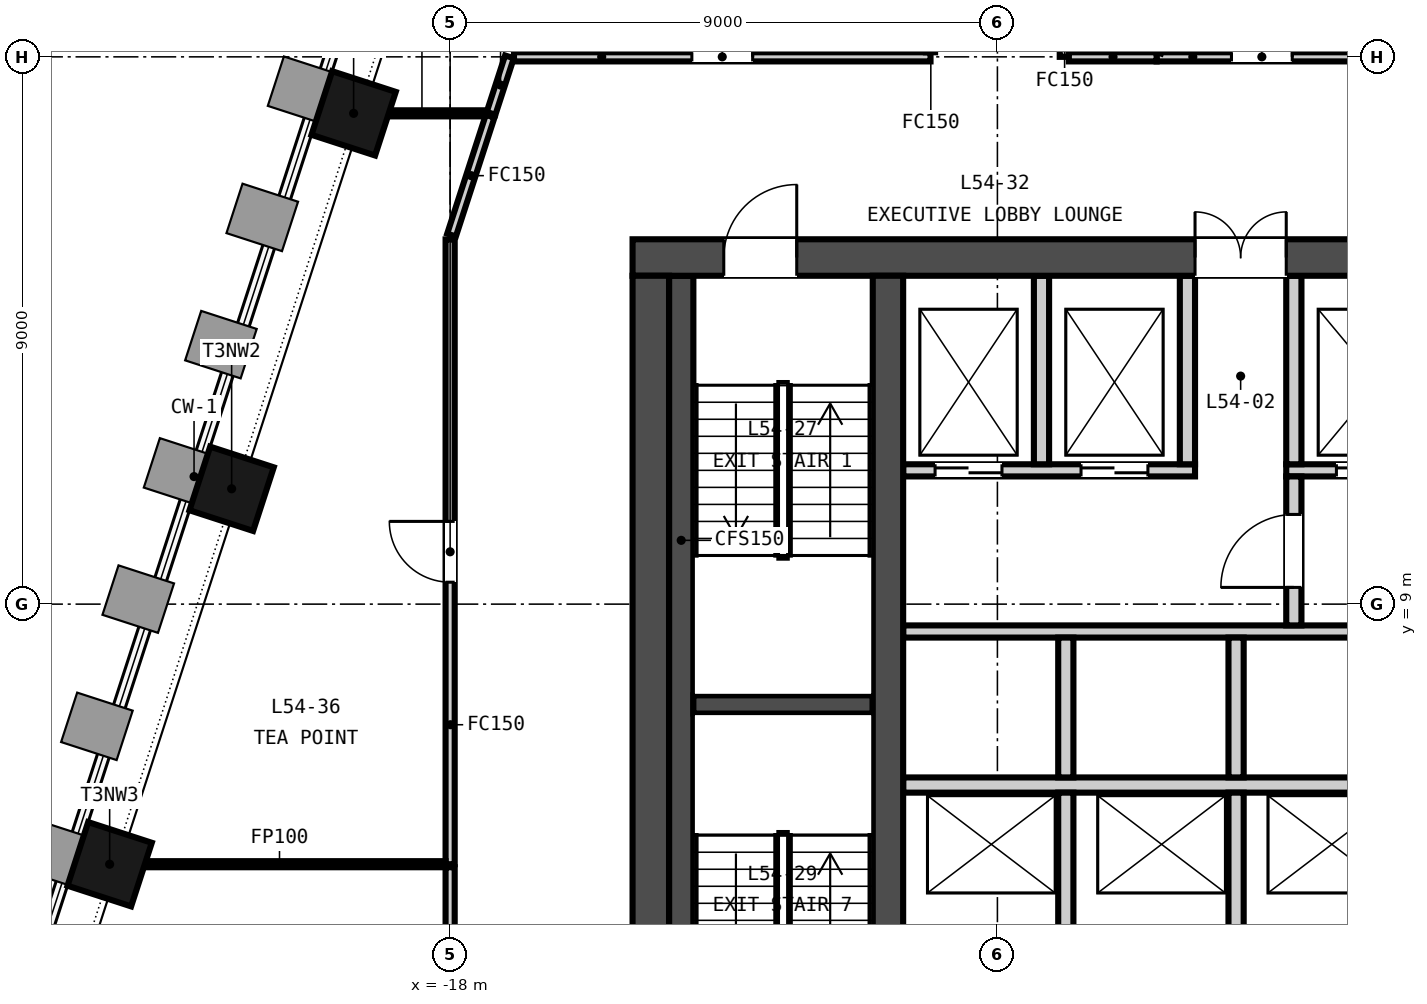
"""IFC4 building model, lengths in metres.
Left out: names, types, materials, properties, quantities, classifications, styles, units other than length and angle.
Written with IfcOpenShell. Run it as: python <this file> out.ifc"""

import sys

from ifc_helpers import new_model, si_unit, direction, frame, frame_2d, origin, origin_2d, place, context, subcontext, project, spatial, rectangle, extrude, element, fill, save


model = new_model("IFC4")
c1 = context("Model", 3, precision=1e-05, world=origin(), true_north=direction((0.0, 1.0)))
c2 = subcontext(c1, "Body", "Model", "MODEL_VIEW")
j1 = project(units=[si_unit("LENGTHUNIT", "METRE"), si_unit("PLANEANGLEUNIT", "RADIAN")], contexts=[c1])
p1 = place(None, origin())
s1 = spatial("IfcSite", under=j1, at=p1, CompositionType="ELEMENT")
p2 = place(p1, origin())
s2 = spatial("IfcBuilding", under=s1, at=p2, CompositionType="ELEMENT")
p3 = place(p2, frame((0.0, 0.0, 216.3)))
s3 = spatial("IfcBuildingStorey", under=s2, at=p3, CompositionType="ELEMENT", Elevation=216.3)
p4 = place(p3, frame((-15.0, 14.7, -0.15), z_axis=(0.0, 0.0, 1.0), x_axis=(1.0, 0.0, 0.0)))
e1 = element("IfcWall", 1, at=p4, inside=s3, PredefinedType="SOLIDWALL", context=c2, shape_type="SweptSolid", body=[
    extrude(rectangle(XDim=30.0, YDim=0.6, at=frame_2d((15.0, 0.0))), origin(), (0.0, 0.0, 1.0), 3.65),
])
p5 = place(p4, frame((9.25, 0.0, 0.15)))
e2 = element("IfcOpeningElement", 2, at=p5, cuts=e1, PredefinedType="OPENING", context=c2, shape_type="SweptSolid", body=[
    extrude(rectangle(XDim=1.5, YDim=2.1, at=frame_2d((0.75, 1.05))), frame((0.0, 0.31, 0.0), z_axis=(0.0, -1.0, 0.0), x_axis=(1.0, 0.0, 0.0)), (0.0, 0.0, 1.0), 0.62),
])
p6 = place(p4, frame((19.4, 0.0, 0.15)))
e3 = element("IfcOpeningElement", 3, at=p6, cuts=e1, PredefinedType="OPENING", context=c2, shape_type="SweptSolid", body=[
    extrude(rectangle(XDim=1.5, YDim=2.1, at=frame_2d((0.75, 1.05))), frame((0.0, 0.31, 0.0), z_axis=(0.0, -1.0, 0.0), x_axis=(1.0, 0.0, 0.0)), (0.0, 0.0, 1.0), 0.62),
])
p7 = place(p4, frame((1.5, 0.0, 0.15)))
e4 = element("IfcOpeningElement", 4, at=p7, cuts=e1, PredefinedType="OPENING", context=c2, shape_type="SweptSolid", body=[
    extrude(rectangle(XDim=1.2, YDim=2.1, at=frame_2d((0.6, 1.05))), frame((0.0, 0.31, 0.0), z_axis=(0.0, -1.0, 0.0), x_axis=(1.0, 0.0, 0.0)), (0.0, 0.0, 1.0), 0.62),
])
p8 = place(p4, frame((27.3, 0.0, 0.15)))
e5 = element("IfcOpeningElement", 5, at=p8, cuts=e1, PredefinedType="OPENING", context=c2, shape_type="SweptSolid", body=[
    extrude(rectangle(XDim=1.2, YDim=2.1, at=frame_2d((0.6, 1.05))), frame((0.0, 0.31, 0.0), z_axis=(0.0, -1.0, 0.0), x_axis=(1.0, 0.0, 0.0)), (0.0, 0.0, 1.0), 0.62),
])
p9 = place(p3, frame((-14.7, 0.6, -0.15), z_axis=(0.0, 0.0, 1.0), x_axis=(0.0, 1.0, 0.0)))
e6 = element("IfcWall", 6, at=p9, inside=s3, PredefinedType="SOLIDWALL", context=c2, shape_type="SweptSolid", body=[
    extrude(rectangle(XDim=13.8, YDim=0.6, at=frame_2d((6.9, 0.0))), origin(), (0.0, 0.0, 1.0), 3.65),
])
p10 = place(p3, frame((-10.8, 0.6, -0.15), z_axis=(0.0, 0.0, 1.0), x_axis=(0.0, 1.0, 0.0)))
e7 = element("IfcWall", 7, at=p10, inside=s3, PredefinedType="SOLIDWALL", context=c2, shape_type="SweptSolid", body=[
    extrude(rectangle(XDim=13.8, YDim=0.5, at=frame_2d((6.9, 0.0))), origin(), (0.0, 0.0, 1.0), 3.65),
])
for number, where, z_axis, x_axis in (
    (8, (-19.587, 17.071, -0.15), (0.0, 0.0, 1.0), (-0.309, -0.951, 0.0)),
    (9, (-21.593, 10.897, -0.15), (0.0, 0.0, 1.0), (-0.309, -0.951, 0.0)),
    (10, (-23.599, 4.723, -0.15), (0.0, 0.0, 1.0), (-0.309, -0.951, 0.0)),
):
    element("IfcColumn", number, at=place(p3, frame(where, z_axis=z_axis, x_axis=x_axis)), inside=s3, PredefinedType="COLUMN", context=c2, shape_type="SweptSolid", body=[
        extrude(rectangle(XDim=1.1, YDim=1.1, at=origin_2d()), origin(), (0.0, 0.0, 1.0), 3.65),
    ])
p11 = place(p3, frame((-10.55, 6.025, 0.0), z_axis=(0.0, 0.0, 1.0), x_axis=(1.0, 0.0, 0.0)))
e11 = element("IfcWall", 11, at=p11, inside=s3, PredefinedType="PARTITIONING", context=c2, shape_type="SweptSolid", body=[
    extrude(rectangle(XDim=21.1, YDim=0.25, at=frame_2d((10.55, 0.0))), origin(), (0.0, 0.0, 1.0), 3.5),
])
p12 = place(p3, frame((-10.55, 8.55, 0.0), z_axis=(0.0, 0.0, 1.0), x_axis=(1.0, 0.0, 0.0)))
e12 = element("IfcWall", 12, at=p12, inside=s3, PredefinedType="PARTITIONING", context=c2, shape_type="SweptSolid", body=[
    extrude(rectangle(XDim=21.1, YDim=0.2, at=frame_2d((10.55, 0.0))), origin(), (0.0, 0.0, 1.0), 3.5),
])
p13 = place(p12, frame((19.9, 0.0, 0.0)))
e13 = element("IfcOpeningElement", 13, at=p13, cuts=e12, PredefinedType="OPENING", context=c2, shape_type="SweptSolid", body=[
    extrude(rectangle(XDim=0.9, YDim=2.1, at=frame_2d((0.45, 1.05))), frame((0.0, 0.11, 0.0), z_axis=(0.0, -1.0, 0.0), x_axis=(1.0, 0.0, 0.0)), (0.0, 0.0, 1.0), 0.22),
])
p14 = place(p3, frame((-10.55, 11.2, 0.0), z_axis=(0.0, 0.0, 1.0), x_axis=(1.0, 0.0, 0.0)))
e14 = element("IfcWall", 14, at=p14, inside=s3, PredefinedType="PARTITIONING", context=c2, shape_type="SweptSolid", body=[
    extrude(rectangle(XDim=4.8, YDim=0.2, at=frame_2d((2.4, 0.0))), origin(), (0.0, 0.0, 1.0), 3.5),
])
p15 = place(p14, frame((0.525, 0.0, 0.0)))
e15 = element("IfcOpeningElement", 15, at=p15, cuts=e14, PredefinedType="OPENING", context=c2, shape_type="SweptSolid", body=[
    extrude(rectangle(XDim=1.1, YDim=2.1, at=frame_2d((0.55, 1.05))), frame((0.0, 0.11, 0.0), z_axis=(0.0, -1.0, 0.0), x_axis=(1.0, 0.0, 0.0)), (0.0, 0.0, 1.0), 0.22),
])
p16 = place(p14, frame((2.925, 0.0, 0.0)))
e16 = element("IfcOpeningElement", 16, at=p16, cuts=e14, PredefinedType="OPENING", context=c2, shape_type="SweptSolid", body=[
    extrude(rectangle(XDim=1.1, YDim=2.1, at=frame_2d((0.55, 1.05))), frame((0.0, 0.11, 0.0), z_axis=(0.0, -1.0, 0.0), x_axis=(1.0, 0.0, 0.0)), (0.0, 0.0, 1.0), 0.22),
])
p17 = place(p3, frame((-4.25, 11.2, 0.0), z_axis=(0.0, 0.0, 1.0), x_axis=(1.0, 0.0, 0.0)))
e17 = element("IfcWall", 17, at=p17, inside=s3, PredefinedType="PARTITIONING", context=c2, shape_type="SweptSolid", body=[
    extrude(rectangle(XDim=8.65, YDim=0.2, at=frame_2d((4.325, 0.0))), origin(), (0.0, 0.0, 1.0), 3.5),
])
p18 = place(p17, frame((0.825, 0.0, 0.0)))
e18 = element("IfcOpeningElement", 18, at=p18, cuts=e17, PredefinedType="OPENING", context=c2, shape_type="SweptSolid", body=[
    extrude(rectangle(XDim=1.4, YDim=2.1, at=frame_2d((0.7, 1.05))), frame((0.0, 0.11, 0.0), z_axis=(0.0, -1.0, 0.0), x_axis=(1.0, 0.0, 0.0)), (0.0, 0.0, 1.0), 0.22),
])
p19 = place(p17, frame((3.625, 0.0, 0.0)))
e19 = element("IfcOpeningElement", 19, at=p19, cuts=e17, PredefinedType="OPENING", context=c2, shape_type="SweptSolid", body=[
    extrude(rectangle(XDim=1.4, YDim=2.1, at=frame_2d((0.7, 1.05))), frame((0.0, 0.11, 0.0), z_axis=(0.0, -1.0, 0.0), x_axis=(1.0, 0.0, 0.0)), (0.0, 0.0, 1.0), 0.22),
])
p20 = place(p3, frame((-4.125, 8.65, 0.0), z_axis=(0.0, 0.0, 1.0), x_axis=(0.0, 1.0, 0.0)))
e20 = element("IfcWall", 20, at=p20, inside=s3, PredefinedType="PARTITIONING", context=c2, shape_type="SweptSolid", body=[
    extrude(rectangle(XDim=2.45, YDim=0.25, at=frame_2d((1.225, 0.0))), origin(), (0.0, 0.0, 1.0), 3.5),
])
p21 = place(p20, frame((0.625, 0.0, 0.0)))
e21 = element("IfcOpeningElement", 21, at=p21, cuts=e20, PredefinedType="OPENING", context=c2, shape_type="SweptSolid", body=[
    extrude(rectangle(XDim=1.2, YDim=2.1, at=frame_2d((0.6, 1.05))), frame((0.0, 0.135, 0.0), z_axis=(0.0, -1.0, 0.0), x_axis=(1.0, 0.0, 0.0)), (0.0, 0.0, 1.0), 0.27),
])
for number, where, z_axis, x_axis in (
    (22, (-7.875, 3.6, 0.0), (0.0, 0.0, 1.0), (0.0, 1.0, 0.0)),
    (23, (-5.075, 3.6, 0.0), (0.0, 0.0, 1.0), (0.0, 1.0, 0.0)),
):
    element("IfcWall", number, at=place(p3, frame(where, z_axis=z_axis, x_axis=x_axis)), inside=s3, PredefinedType="PARTITIONING", context=c2, shape_type="SweptSolid", body=[
        extrude(rectangle(XDim=2.3, YDim=0.25, at=frame_2d((1.15, 0.0))), origin(), (0.0, 0.0, 1.0), 3.5),
    ])
for number, where, z_axis, x_axis in (
    (24, (-7.875, 6.15, 0.0), (0.0, 0.0, 1.0), (0.0, 1.0, 0.0)),
    (25, (-5.075, 6.15, 0.0), (0.0, 0.0, 1.0), (0.0, 1.0, 0.0)),
):
    element("IfcWall", number, at=place(p3, frame(where, z_axis=z_axis, x_axis=x_axis)), inside=s3, PredefinedType="PARTITIONING", context=c2, shape_type="SweptSolid", body=[
        extrude(rectangle(XDim=2.3, YDim=0.25, at=frame_2d((1.15, 0.0))), origin(), (0.0, 0.0, 1.0), 3.5),
    ])
for number, where, z_axis, x_axis in (
    (26, (-8.275, 11.3, 0.0), (0.0, 0.0, 1.0), (0.0, 1.0, 0.0)),
    (27, (-5.875, 11.3, 0.0), (0.0, 0.0, 1.0), (0.0, 1.0, 0.0)),
    (28, (-4.125, 11.3, 0.0), (0.0, 0.0, 1.0), (0.0, 1.0, 0.0)),
):
    element("IfcWall", number, at=place(p3, frame(where, z_axis=z_axis, x_axis=x_axis)), inside=s3, PredefinedType="PARTITIONING", context=c2, shape_type="SweptSolid", body=[
        extrude(rectangle(XDim=3.1, YDim=0.25, at=frame_2d((1.55, 0.0))), origin(), (0.0, 0.0, 1.0), 3.5),
    ])
p22 = place(p3, frame((-14.0, 7.35, 0.0), z_axis=(0.0, 0.0, 1.0), x_axis=(1.0, 0.0, 0.0)))
e29 = element("IfcWall", 29, at=p22, inside=s3, PredefinedType="SOLIDWALL", context=c2, shape_type="SweptSolid", body=[
    extrude(rectangle(XDim=2.95, YDim=0.3, at=frame_2d((1.475, 0.0))), origin(), (0.0, 0.0, 1.0), 3.5),
])
p23 = place(p3, frame((-14.2, 0.6, 0.0), z_axis=(0.0, 0.0, 1.0), x_axis=(0.0, 1.0, 0.0)))
e30 = element("IfcWall", 30, at=p23, inside=s3, PredefinedType="SOLIDWALL", context=c2, shape_type="SweptSolid", body=[
    extrude(rectangle(XDim=13.8, YDim=0.4, at=frame_2d((6.9, 0.0))), origin(), (0.0, 0.0, 1.0), 3.5),
])
p24 = place(p3, frame((-7.9, 22.0, 0.0), z_axis=(0.0, 0.0, 1.0), x_axis=(0.0, -1.0, 0.0)))
e31 = element("IfcWall", 31, at=p24, inside=s3, PredefinedType="PARTITIONING", context=c2, shape_type="SweptSolid", body=[
    extrude(rectangle(XDim=4.0, YDim=0.15, at=frame_2d((2.0, 0.0))), origin(), (0.0, 0.0, 1.0), 2.751),
])
p25 = place(p24, frame((1.5, 0.0, 0.0)))
e32 = element("IfcOpeningElement", 32, at=p25, cuts=e31, PredefinedType="OPENING", context=c2, shape_type="SweptSolid", body=[
    extrude(rectangle(XDim=1.0, YDim=2.1, at=frame_2d((0.5, 1.05))), frame((0.0, 0.085, 0.0), z_axis=(0.0, -1.0, 0.0), x_axis=(1.0, 0.0, 0.0)), (0.0, 0.0, 1.0), 0.17),
])
p26 = place(p3, frame((-17.327, 17.071, 0.0), z_axis=(0.0, 0.0, 1.0), x_axis=(0.309170843074, 0.951006514064, 0.0)))
e33 = element("IfcWall", 33, at=p26, inside=s3, PredefinedType="PARTITIONING", context=c2, shape_type="SweptSolid", body=[
    extrude(rectangle(XDim=0.977, YDim=0.15, at=frame_2d((0.488, 0.0))), origin(), (0.0, 0.0, 1.0), 2.751),
])
p27 = place(p3, frame((-16.95, 18.0, 0.0), z_axis=(0.0, 0.0, 1.0), x_axis=(1.0, 0.0, 0.0)))
e34 = element("IfcWall", 34, at=p27, inside=s3, PredefinedType="PARTITIONING", context=c2, shape_type="SweptSolid", body=[
    extrude(rectangle(XDim=6.85, YDim=0.15, at=frame_2d((3.425, 0.0))), origin(), (0.0, 0.0, 1.0), 2.751),
])
p28 = place(p27, frame((2.925, 0.0, 0.0)))
e35 = element("IfcOpeningElement", 35, at=p28, cuts=e34, PredefinedType="OPENING", context=c2, shape_type="SweptSolid", body=[
    extrude(rectangle(XDim=1.0, YDim=2.1, at=frame_2d((0.5, 1.05))), frame((0.0, 0.085, 0.0), z_axis=(0.0, -1.0, 0.0), x_axis=(1.0, 0.0, 0.0)), (0.0, 0.0, 1.0), 0.17),
])
p29 = place(p3, frame((-19.535, 17.071, 0.0), z_axis=(0.0, 0.0, 1.0), x_axis=(1.0, 0.0, 0.0)))
e36 = element("IfcWall", 36, at=p29, inside=s3, PredefinedType="PARTITIONING", context=c2, shape_type="SweptSolid", body=[
    extrude(rectangle(XDim=2.133, YDim=0.1, at=frame_2d((1.066, 0.0))), origin(), (0.0, 0.0, 1.0), 2.751),
])
p30 = place(p3, frame((-18.0, 4.723, 0.0), z_axis=(0.0, 0.0, 1.0), x_axis=(0.0, 1.0, 0.0)))
e37 = element("IfcWall", 37, at=p30, inside=s3, PredefinedType="PARTITIONING", context=c2, shape_type="SweptSolid", body=[
    extrude(rectangle(XDim=10.275, YDim=0.15, at=frame_2d((5.138, 0.0))), origin(), (0.0, 0.0, 1.0), 2.751),
])
p31 = place(p30, frame((4.637, 0.0, 0.0)))
e38 = element("IfcOpeningElement", 38, at=p31, cuts=e37, PredefinedType="OPENING", context=c2, shape_type="SweptSolid", body=[
    extrude(rectangle(XDim=1.0, YDim=2.1, at=frame_2d((0.5, 1.05))), frame((0.0, 0.085, 0.0), z_axis=(0.0, -1.0, 0.0), x_axis=(1.0, 0.0, 0.0)), (0.0, 0.0, 1.0), 0.17),
])
p32 = place(p3, frame((-17.977, 15.069, 0.0), z_axis=(0.0, 0.0, 1.0), x_axis=(0.308838863498, 0.951114376084, 0.0)))
e39 = element("IfcWall", 39, at=p32, inside=s3, PredefinedType="PARTITIONING", context=c2, shape_type="SweptSolid", body=[
    extrude(rectangle(XDim=2.054, YDim=0.15, at=frame_2d((1.027, 0.0))), origin(), (0.0, 0.0, 1.0), 2.751),
])
p33 = place(p3, frame((-23.547, 4.723, 0.0), z_axis=(0.0, 0.0, 1.0), x_axis=(1.0, 0.0, 0.0)))
e40 = element("IfcWall", 40, at=p33, inside=s3, PredefinedType="PARTITIONING", context=c2, shape_type="SweptSolid", body=[
    extrude(rectangle(XDim=5.472, YDim=0.1, at=frame_2d((2.736, 0.0))), origin(), (0.0, 0.0, 1.0), 2.751),
])
p34 = place(p3, frame((-18.0, -3.125, 0.0), z_axis=(0.0, 0.0, 1.0), x_axis=(0.0, 1.0, 0.0)))
e41 = element("IfcWall", 41, at=p34, inside=s3, PredefinedType="PARTITIONING", context=c2, shape_type="SweptSolid", body=[
    extrude(rectangle(XDim=7.798, YDim=0.15, at=frame_2d((3.899, 0.0))), origin(), (0.0, 0.0, 1.0), 2.751),
])
p35 = place(p34, frame((2.999, 0.0, 0.0)))
e42 = element("IfcOpeningElement", 42, at=p35, cuts=e41, PredefinedType="OPENING", context=c2, shape_type="SweptSolid", body=[
    extrude(rectangle(XDim=1.8, YDim=2.1, at=frame_2d((0.9, 1.05))), frame((0.0, 0.085, 0.0), z_axis=(0.0, -1.0, 0.0), x_axis=(1.0, 0.0, 0.0)), (0.0, 0.0, 1.0), 0.17),
])
p36 = place(p3, frame((-6.382, 18.0, 0.0), z_axis=(0.0, 0.0, 1.0), x_axis=(1.0, 0.0, 0.0)))
e43 = element("IfcWall", 43, at=p36, inside=s3, PredefinedType="PARTITIONING", context=c2, shape_type="SweptSolid", body=[
    extrude(rectangle(XDim=3.462, YDim=0.15, at=frame_2d((1.731, 0.0))), origin(), (0.0, 0.0, 1.0), 2.751),
])
p37 = place(p36, frame((1.231, 0.0, 0.0)))
e44 = element("IfcOpeningElement", 44, at=p37, cuts=e43, PredefinedType="OPENING", context=c2, shape_type="SweptSolid", body=[
    extrude(rectangle(XDim=1.0, YDim=2.1, at=frame_2d((0.5, 1.05))), frame((0.0, 0.085, 0.0), z_axis=(0.0, -1.0, 0.0), x_axis=(1.0, 0.0, 0.0)), (0.0, 0.0, 1.0), 0.17),
])
p38 = place(p3, frame((-7.825, 18.0, 0.0), z_axis=(0.0, 0.0, 1.0), x_axis=(1.0, 0.0, 0.0)))
e45 = element("IfcWall", 45, at=p38, inside=s3, PredefinedType="PARTITIONING", context=c2, shape_type="SweptSolid", body=[
    extrude(rectangle(XDim=1.443, YDim=0.15, at=frame_2d((0.721, 0.0))), origin(), (0.0, 0.0, 1.0), 2.751),
])
p39 = place(p3, frame((-6.358, 18.071, 0.0), z_axis=(0.0, 0.0, 1.0), x_axis=(0.316688766046, 0.9485295069, 0.0)))
e46 = element("IfcWall", 46, at=p39, inside=s3, PredefinedType="PARTITIONING", context=c2, shape_type="SweptSolid", body=[
    extrude(rectangle(XDim=6.672, YDim=0.1, at=frame_2d((3.336, 0.0))), origin(), (0.0, 0.0, 1.0), 2.751),
])
p40 = place(p21, origin())
e47 = element("IfcDoor", 47, at=p40, inside=s3, OperationType="SINGLE_SWING_LEFT", PredefinedType="DOOR", context=c2, shape_type="SweptSolid", body=[
    extrude(rectangle(XDim=1.2, YDim=2.1, at=frame_2d((0.6, 1.05))), frame((0.0, 0.025, 0.0), z_axis=(0.0, -1.0, 0.0), x_axis=(1.0, 0.0, 0.0)), (0.0, 0.0, 1.0), 0.05),
])
fill(e21, e47)
p41 = place(p15, origin())
e48 = element("IfcDoor", 48, at=p41, inside=s3, OperationType="DOUBLE_DOOR_SLIDING", PredefinedType="DOOR", context=c2, shape_type="SweptSolid", body=[
    extrude(rectangle(XDim=1.1, YDim=2.1, at=frame_2d((0.55, 1.05))), frame((0.0, 0.025, 0.0), z_axis=(0.0, -1.0, 0.0), x_axis=(1.0, 0.0, 0.0)), (0.0, 0.0, 1.0), 0.05),
])
fill(e15, e48)
p42 = place(p16, origin())
e49 = element("IfcDoor", 49, at=p42, inside=s3, OperationType="DOUBLE_DOOR_SLIDING", PredefinedType="DOOR", context=c2, shape_type="SweptSolid", body=[
    extrude(rectangle(XDim=1.1, YDim=2.1, at=frame_2d((0.55, 1.05))), frame((0.0, 0.025, 0.0), z_axis=(0.0, -1.0, 0.0), x_axis=(1.0, 0.0, 0.0)), (0.0, 0.0, 1.0), 0.05),
])
fill(e16, e49)
p43 = place(p18, origin())
e50 = element("IfcDoor", 50, at=p43, inside=s3, OperationType="DOUBLE_DOOR_SLIDING", PredefinedType="DOOR", context=c2, shape_type="SweptSolid", body=[
    extrude(rectangle(XDim=1.4, YDim=2.1, at=frame_2d((0.7, 1.05))), frame((0.0, 0.025, 0.0), z_axis=(0.0, -1.0, 0.0), x_axis=(1.0, 0.0, 0.0)), (0.0, 0.0, 1.0), 0.05),
])
fill(e18, e50)
p44 = place(p5, origin())
e51 = element("IfcDoor", 51, at=p44, inside=s3, OperationType="DOUBLE_DOOR_SINGLE_SWING", PredefinedType="DOOR", context=c2, shape_type="SweptSolid", body=[
    extrude(rectangle(XDim=1.5, YDim=2.1, at=frame_2d((0.75, 1.05))), frame((0.0, 0.025, 0.0), z_axis=(0.0, -1.0, 0.0), x_axis=(1.0, 0.0, 0.0)), (0.0, 0.0, 1.0), 0.05),
])
fill(e2, e51)
p45 = place(p7, origin())
e52 = element("IfcDoor", 52, at=p45, inside=s3, OperationType="SINGLE_SWING_RIGHT", PredefinedType="DOOR", context=c2, shape_type="SweptSolid", body=[
    extrude(rectangle(XDim=1.2, YDim=2.1, at=frame_2d((0.6, 1.05))), frame((0.0, 0.025, 0.0), z_axis=(0.0, -1.0, 0.0), x_axis=(1.0, 0.0, 0.0)), (0.0, 0.0, 1.0), 0.05),
])
fill(e4, e52)
p46 = place(p28, origin())
e53 = element("IfcDoor", 53, at=p46, inside=s3, OperationType="SINGLE_SWING_RIGHT", PredefinedType="DOOR", context=c2, shape_type="SweptSolid", body=[
    extrude(rectangle(XDim=1.0, YDim=2.1, at=frame_2d((0.5, 1.05))), frame((0.0, 0.025, 0.0), z_axis=(0.0, -1.0, 0.0), x_axis=(1.0, 0.0, 0.0)), (0.0, 0.0, 1.0), 0.05),
])
fill(e35, e53)
p47 = place(p31, origin())
e54 = element("IfcDoor", 54, at=p47, inside=s3, OperationType="SINGLE_SWING_RIGHT", PredefinedType="DOOR", context=c2, shape_type="SweptSolid", body=[
    extrude(rectangle(XDim=1.0, YDim=2.1, at=frame_2d((0.5, 1.05))), frame((0.0, 0.025, 0.0), z_axis=(0.0, -1.0, 0.0), x_axis=(1.0, 0.0, 0.0)), (0.0, 0.0, 1.0), 0.05),
])
fill(e38, e54)
p48 = place(p37, origin())
e55 = element("IfcDoor", 55, at=p48, inside=s3, OperationType="SINGLE_SWING_RIGHT", PredefinedType="DOOR", context=c2, shape_type="SweptSolid", body=[
    extrude(rectangle(XDim=1.0, YDim=2.1, at=frame_2d((0.5, 1.05))), frame((0.0, 0.025, 0.0), z_axis=(0.0, -1.0, 0.0), x_axis=(1.0, 0.0, 0.0)), (0.0, 0.0, 1.0), 0.05),
])
fill(e44, e55)
save(model, sys.argv[1])
